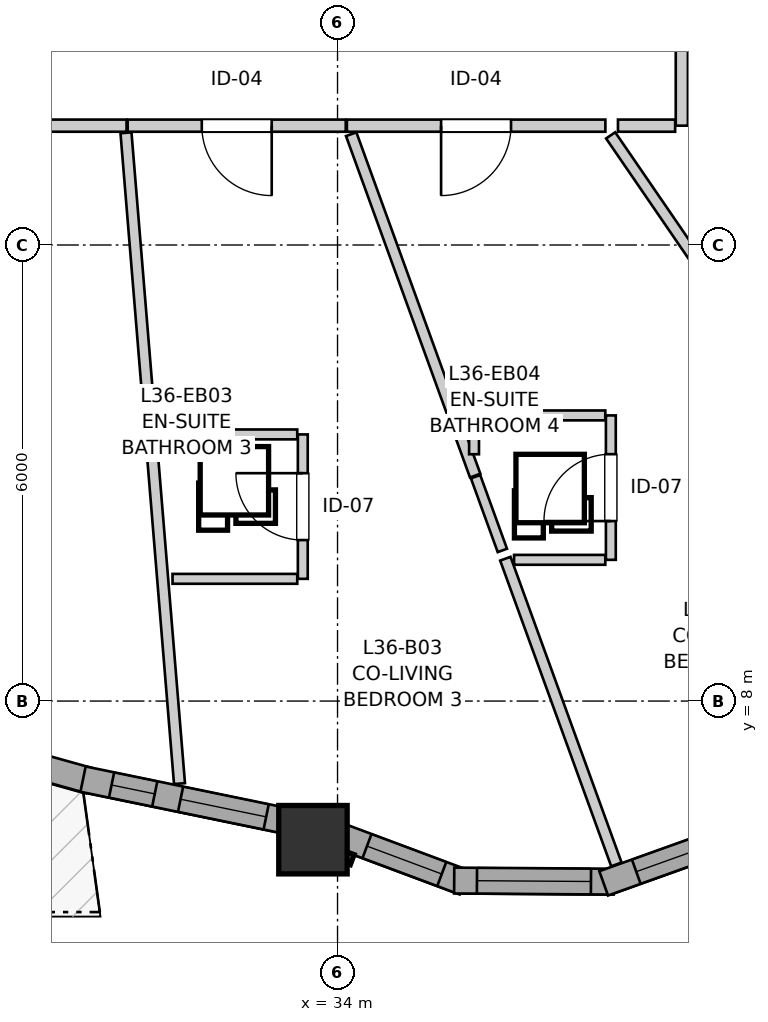
"""IFC4 building model, lengths in metres.
Left out: names, types, materials, properties, quantities, classifications, styles, units other than length and angle.
Written with IfcOpenShell. Run it as: python <this file> out.ifc"""

import sys

from ifc_helpers import new_model, si_unit, direction, frame, frame_2d, origin, origin_2d, place, context, subcontext, project, spatial, rectangle, extrude, source, transform, mapped, element, fill, save


model = new_model("IFC4")
c1 = context("Model", 3, precision=1e-05, world=origin(), true_north=direction((0.0, 1.0)))
c2 = subcontext(c1, "Body", "Model", "MODEL_VIEW")
j1 = project(units=[si_unit("LENGTHUNIT", "METRE"), si_unit("PLANEANGLEUNIT", "RADIAN")], contexts=[c1])
p1 = place(None, origin())
s1 = spatial("IfcSite", under=j1, at=p1, CompositionType="ELEMENT")
p2 = place(p1, origin())
s2 = spatial("IfcBuilding", under=s1, at=p2, CompositionType="ELEMENT")
p3 = place(p2, frame((0.0, 0.0, 121.6)))
s3 = spatial("IfcBuildingStorey", under=s2, at=p3, CompositionType="ELEMENT", Elevation=121.6)
m1 = source(origin(), c2, "Body", "SweptSolid", [
    extrude(rectangle(XDim=0.9, YDim=0.9, at=origin_2d()), origin(), (0.0, 0.0, 1.0), 2.95),
])
p4 = place(p3, frame((33.677, 6.176, 0.0), z_axis=(0.0, 0.0, 1.0), x_axis=(1.0, 0.0, 0.0)))
e1 = element("IfcColumn", 1, at=p4, inside=s3, PredefinedType="COLUMN", context=c2, shape_type="MappedRepresentation", body=[
    mapped(m1, transform((0.0, 0.0, 0.0), x_axis=(1.0, 0.0, 0.0), y_axis=(0.0, 1.0, 0.0), z_axis=(0.0, 0.0, 1.0), scale=1.0)),
])
p5 = place(p3, frame((27.811, 7.771, 0.0), z_axis=(0.0, 0.0, 1.0), x_axis=(0.963039905189, -0.269358758934, 0.0)))
e2 = element("IfcWall", 2, at=p5, inside=s3, PredefinedType="SOLIDWALL", context=c2, shape_type="SweptSolid", body=[
    extrude(rectangle(XDim=3.039, YDim=0.34, at=frame_2d((1.52, 0.0))), origin(), (0.0, 0.0, 1.0), 2.48),
])
p6 = place(p5, frame((0.935, 0.0, 0.82)))
e3 = element("IfcOpeningElement", 3, at=p6, cuts=e2, PredefinedType="OPENING", context=c2, shape_type="SweptSolid", body=[
    extrude(rectangle(XDim=1.15, YDim=1.2, at=frame_2d((0.575, 0.6))), frame((0.0, 0.18, 0.0), z_axis=(0.0, -1.0, 0.0), x_axis=(1.0, 0.0, 0.0)), (0.0, 0.0, 1.0), 0.36),
])
p7 = place(p3, frame((30.652, 6.973, 0.0), z_axis=(0.0, 0.0, 1.0), x_axis=(0.979418300652, -0.201841007595, 0.0)))
e4 = element("IfcWall", 4, at=p7, inside=s3, PredefinedType="SOLIDWALL", context=c2, shape_type="SweptSolid", body=[
    extrude(rectangle(XDim=2.893, YDim=0.34, at=frame_2d((1.447, 0.0))), origin(), (0.0, 0.0, 1.0), 2.48),
])
p8 = place(p7, frame((0.383, 0.0, 0.82)))
e5 = element("IfcOpeningElement", 5, at=p8, cuts=e4, PredefinedType="OPENING", context=c2, shape_type="SweptSolid", body=[
    extrude(rectangle(XDim=0.58, YDim=1.35, at=frame_2d((0.29, 0.675))), frame((0.0, 0.18, 0.0), z_axis=(0.0, -1.0, 0.0), x_axis=(1.0, 0.0, 0.0)), (0.0, 0.0, 1.0), 0.36),
])
p9 = place(p7, frame((1.31, 0.0, 0.82)))
e6 = element("IfcOpeningElement", 6, at=p9, cuts=e4, PredefinedType="OPENING", context=c2, shape_type="SweptSolid", body=[
    extrude(rectangle(XDim=1.15, YDim=1.2, at=frame_2d((0.575, 0.6))), frame((0.0, 0.18, 0.0), z_axis=(0.0, -1.0, 0.0), x_axis=(1.0, 0.0, 0.0)), (0.0, 0.0, 1.0), 0.36),
])
p10 = place(p3, frame((33.952, 6.255, 0.0), z_axis=(0.0, 0.0, 1.0), x_axis=(0.936799566991, -0.349866504951, 0.0)))
e7 = element("IfcWall", 7, at=p10, inside=s3, PredefinedType="SOLIDWALL", context=c2, shape_type="SweptSolid", body=[
    extrude(rectangle(XDim=1.831, YDim=0.34, at=frame_2d((0.916, 0.0))), origin(), (0.0, 0.0, 1.0), 2.48),
])
p11 = place(p10, frame((0.466, 0.0, 0.82)))
e8 = element("IfcOpeningElement", 8, at=p11, cuts=e7, PredefinedType="OPENING", context=c2, shape_type="SweptSolid", body=[
    extrude(rectangle(XDim=1.05, YDim=1.45, at=frame_2d((0.525, 0.725))), frame((0.0, 0.18, 0.0), z_axis=(0.0, -1.0, 0.0), x_axis=(1.0, 0.0, 0.0)), (0.0, 0.0, 1.0), 0.36),
])
p12 = place(p3, frame((35.535, 5.639, 0.0), z_axis=(0.0, 0.0, 1.0), x_axis=(0.999976456891, -0.00686189939, 0.0)))
e9 = element("IfcWall", 9, at=p12, inside=s3, PredefinedType="SOLIDWALL", context=c2, shape_type="SweptSolid", body=[
    extrude(rectangle(XDim=2.099, YDim=0.34, at=frame_2d((1.05, 0.0))), origin(), (0.0, 0.0, 1.0), 2.48),
])
p13 = place(p12, frame((0.3, 0.0, 0.82)))
e10 = element("IfcOpeningElement", 10, at=p13, cuts=e9, PredefinedType="OPENING", context=c2, shape_type="SweptSolid", body=[
    extrude(rectangle(XDim=1.5, YDim=1.45, at=frame_2d((0.75, 0.725))), frame((0.0, 0.18, 0.0), z_axis=(0.0, -1.0, 0.0), x_axis=(1.0, 0.0, 0.0)), (0.0, 0.0, 1.0), 0.36),
])
p14 = place(p3, frame((37.502, 5.602, 0.0), z_axis=(0.0, 0.0, 1.0), x_axis=(0.941523304278, 0.336947870598, 0.0)))
e11 = element("IfcWall", 11, at=p14, inside=s3, PredefinedType="SOLIDWALL", context=c2, shape_type="SweptSolid", body=[
    extrude(rectangle(XDim=2.099, YDim=0.34, at=frame_2d((1.05, 0.0))), origin(), (0.0, 0.0, 1.0), 2.48),
])
p15 = place(p14, frame((0.455, 0.0, 0.82)))
e12 = element("IfcOpeningElement", 12, at=p15, cuts=e11, PredefinedType="OPENING", context=c2, shape_type="SweptSolid", body=[
    extrude(rectangle(XDim=1.35, YDim=1.45, at=frame_2d((0.675, 0.725))), frame((0.0, 0.18, 0.0), z_axis=(0.0, -1.0, 0.0), x_axis=(1.0, 0.0, 0.0)), (0.0, 0.0, 1.0), 0.36),
])
p16 = place(p3, frame((38.53, 21.321, 0.0), z_axis=(0.0, 0.0, 1.0), x_axis=(0.0, -1.0, 0.0)))
e13 = element("IfcWall", 13, at=p16, inside=s3, PredefinedType="PARTITIONING", context=c2, shape_type="SweptSolid", body=[
    extrude(rectangle(XDim=5.751, YDim=0.16, at=frame_2d((2.875, 0.0))), origin(), (0.0, 0.0, 1.0), 2.95),
])
p17 = place(p16, frame((2.404, 0.0, 0.0)))
e14 = element("IfcOpeningElement", 14, at=p17, cuts=e13, PredefinedType="OPENING", context=c2, shape_type="SweptSolid", body=[
    extrude(rectangle(XDim=0.96, YDim=2.1, at=frame_2d((0.48, 1.05))), frame((0.0, 0.09, 0.0), z_axis=(0.0, -1.0, 0.0), x_axis=(1.0, 0.0, 0.0)), (0.0, 0.0, 1.0), 0.18),
])
p18 = place(p3, frame((31.224, 15.57, 0.0), z_axis=(0.0, 0.0, 1.0), x_axis=(-1.0, 0.0, 0.0)))
e15 = element("IfcWall", 15, at=p18, inside=s3, PredefinedType="PARTITIONING", context=c2, shape_type="SweptSolid", body=[
    extrude(rectangle(XDim=3.679, YDim=0.16, at=frame_2d((1.84, 0.0))), origin(), (0.0, 0.0, 1.0), 2.95),
])
p19 = place(p18, frame((1.212, 0.0, 0.0)))
e16 = element("IfcOpeningElement", 16, at=p19, cuts=e15, PredefinedType="OPENING", context=c2, shape_type="SweptSolid", body=[
    extrude(rectangle(XDim=1.3, YDim=2.1, at=frame_2d((0.65, 1.05))), frame((0.0, 0.09, 0.0), z_axis=(0.0, -1.0, 0.0), x_axis=(1.0, 0.0, 0.0)), (0.0, 0.0, 1.0), 0.18),
])
p20 = place(p3, frame((37.524, 15.57, 0.0), z_axis=(0.0, 0.0, 1.0), x_axis=(-1.0, 0.0, 0.0)))
e17 = element("IfcWall", 17, at=p20, inside=s3, PredefinedType="PARTITIONING", context=c2, shape_type="SweptSolid", body=[
    extrude(rectangle(XDim=3.401, YDim=0.16, at=frame_2d((1.7, 0.0))), origin(), (0.0, 0.0, 1.0), 2.95),
])
p21 = place(p20, frame((1.241, 0.0, 0.0)))
e18 = element("IfcOpeningElement", 18, at=p21, cuts=e17, PredefinedType="OPENING", context=c2, shape_type="SweptSolid", body=[
    extrude(rectangle(XDim=0.92, YDim=2.1, at=frame_2d((0.46, 1.05))), frame((0.0, 0.09, 0.0), z_axis=(0.0, -1.0, 0.0), x_axis=(1.0, 0.0, 0.0)), (0.0, 0.0, 1.0), 0.18),
])
p22 = place(p3, frame((34.108, 15.57, 0.0), z_axis=(0.0, 0.0, 1.0), x_axis=(-1.0, 0.0, 0.0)))
e19 = element("IfcWall", 19, at=p22, inside=s3, PredefinedType="PARTITIONING", context=c2, shape_type="SweptSolid", body=[
    extrude(rectangle(XDim=2.869, YDim=0.16, at=frame_2d((1.435, 0.0))), origin(), (0.0, 0.0, 1.0), 2.95),
])
p23 = place(p22, frame((0.974, 0.0, 0.0)))
e20 = element("IfcOpeningElement", 20, at=p23, cuts=e19, PredefinedType="OPENING", context=c2, shape_type="SweptSolid", body=[
    extrude(rectangle(XDim=0.92, YDim=2.1, at=frame_2d((0.46, 1.05))), frame((0.0, 0.09, 0.0), z_axis=(0.0, -1.0, 0.0), x_axis=(1.0, 0.0, 0.0)), (0.0, 0.0, 1.0), 0.18),
])
p24 = place(p3, frame((33.543, 9.608, 0.0), z_axis=(0.0, 0.0, 1.0), x_axis=(0.0, 1.0, 0.0)))
e21 = element("IfcWall", 21, at=p24, inside=s3, PredefinedType="PARTITIONING", context=c2, shape_type="SweptSolid", body=[
    extrude(rectangle(XDim=1.9, YDim=0.13, at=frame_2d((0.95, 0.0))), origin(), (0.0, 0.0, 1.0), 2.95),
])
p25 = place(p24, frame((0.51, 0.0, 0.0)))
e22 = element("IfcOpeningElement", 22, at=p25, cuts=e21, PredefinedType="OPENING", context=c2, shape_type="SweptSolid", body=[
    extrude(rectangle(XDim=0.88, YDim=2.05, at=frame_2d((0.44, 1.025))), frame((0.0, 0.075, 0.0), z_axis=(0.0, -1.0, 0.0), x_axis=(1.0, 0.0, 0.0)), (0.0, 0.0, 1.0), 0.15),
])
p26 = place(p3, frame((37.596, 9.858, 0.0), z_axis=(0.0, 0.0, 1.0), x_axis=(0.0, 1.0, 0.0)))
e23 = element("IfcWall", 23, at=p26, inside=s3, PredefinedType="PARTITIONING", context=c2, shape_type="SweptSolid", body=[
    extrude(rectangle(XDim=1.9, YDim=0.13, at=frame_2d((0.95, 0.0))), origin(), (0.0, 0.0, 1.0), 2.95),
])
p27 = place(p26, frame((0.51, 0.0, 0.0)))
e24 = element("IfcOpeningElement", 24, at=p27, cuts=e23, PredefinedType="OPENING", context=c2, shape_type="SweptSolid", body=[
    extrude(rectangle(XDim=0.88, YDim=2.05, at=frame_2d((0.44, 1.025))), frame((0.0, 0.075, 0.0), z_axis=(0.0, -1.0, 0.0), x_axis=(1.0, 0.0, 0.0)), (0.0, 0.0, 1.0), 0.15),
])
p28 = place(p3, frame((31.217, 15.476, 0.0), z_axis=(0.0, 0.0, 1.0), x_axis=(0.081928316893, -0.996638224679, 0.0)))
e25 = element("IfcWall", 25, at=p28, inside=s3, PredefinedType="PARTITIONING", context=c2, shape_type="SweptSolid", body=[
    extrude(rectangle(XDim=8.591, YDim=0.145, at=frame_2d((4.295, 0.0))), origin(), (0.0, 0.0, 1.0), 2.95),
])
p29 = place(p3, frame((37.594, 15.442, 0.0), z_axis=(0.0, 0.0, 1.0), x_axis=(0.565681325722, -0.824623937155, 0.0)))
e26 = element("IfcWall", 26, at=p29, inside=s3, PredefinedType="PARTITIONING", context=c2, shape_type="SweptSolid", body=[
    extrude(rectangle(XDim=7.35, YDim=0.145, at=frame_2d((3.675, 0.0))), origin(), (0.0, 0.0, 1.0), 2.95),
])
p30 = place(p3, frame((34.18, 15.458, 0.0), z_axis=(0.0, 0.0, 1.0), x_axis=(0.341373856507, -0.939927598325, 0.0)))
e27 = element("IfcWall", 27, at=p30, inside=s3, PredefinedType="PARTITIONING", context=c2, shape_type="SweptSolid", body=[
    extrude(rectangle(XDim=4.779, YDim=0.145, at=frame_2d((2.389, 0.0))), origin(), (0.0, 0.0, 1.0), 2.95),
])
p31 = place(p3, frame((36.208, 9.873, 0.0), z_axis=(0.0, 0.0, 1.0), x_axis=(0.341362804218, -0.939931612351, 0.0)))
e28 = element("IfcWall", 28, at=p31, inside=s3, PredefinedType="PARTITIONING", context=c2, shape_type="SweptSolid", body=[
    extrude(rectangle(XDim=4.279, YDim=0.145, at=frame_2d((2.14, 0.0))), origin(), (0.0, 0.0, 1.0), 2.95),
])
p32 = place(p3, frame((31.743, 11.508, 0.0), z_axis=(0.0, 0.0, 1.0), x_axis=(1.0, 0.0, 0.0)))
e29 = element("IfcWall", 29, at=p32, inside=s3, PredefinedType="PARTITIONING", context=c2, shape_type="SweptSolid", body=[
    extrude(rectangle(XDim=1.727, YDim=0.13, at=frame_2d((0.864, 0.0))), origin(), (0.0, 0.0, 1.0), 2.95),
])
p33 = place(p3, frame((31.829, 9.608, 0.0), z_axis=(0.0, 0.0, 1.0), x_axis=(1.0, 0.0, 0.0)))
e30 = element("IfcWall", 30, at=p33, inside=s3, PredefinedType="PARTITIONING", context=c2, shape_type="SweptSolid", body=[
    extrude(rectangle(XDim=1.641, YDim=0.13, at=frame_2d((0.82, 0.0))), origin(), (0.0, 0.0, 1.0), 2.558),
])
p34 = place(p3, frame((35.796, 11.758, 0.0), z_axis=(0.0, 0.0, 1.0), x_axis=(1.0, 0.0, 0.0)))
e31 = element("IfcWall", 31, at=p34, inside=s3, PredefinedType="PARTITIONING", context=c2, shape_type="SweptSolid", body=[
    extrude(rectangle(XDim=1.727, YDim=0.13, at=frame_2d((0.864, 0.0))), origin(), (0.0, 0.0, 1.0), 2.95),
])
p35 = place(p3, frame((36.323, 9.858, 0.0), z_axis=(0.0, 0.0, 1.0), x_axis=(1.0, 0.0, 0.0)))
e32 = element("IfcWall", 32, at=p35, inside=s3, PredefinedType="PARTITIONING", context=c2, shape_type="SweptSolid", body=[
    extrude(rectangle(XDim=1.2, YDim=0.13, at=frame_2d((0.6, 0.0))), origin(), (0.0, 0.0, 1.0), 2.95),
])
p36 = place(p3, frame((35.816, 10.952, 0.0), z_axis=(0.0, 0.0, 1.0), x_axis=(0.341515178303, -0.939876259403, 0.0)))
e33 = element("IfcWall", 33, at=p36, inside=s3, PredefinedType="PARTITIONING", context=c2, shape_type="SweptSolid", body=[
    extrude(rectangle(XDim=1.032, YDim=0.13, at=frame_2d((0.516, 0.0))), origin(), (0.0, 0.0, 1.0), 2.95),
])
p37 = place(p3, frame((37.69, 15.57, 0.0), z_axis=(0.0, 0.0, 1.0), x_axis=(1.0, 0.0, 0.0)))
e34 = element("IfcWall", 34, at=p37, inside=s3, PredefinedType="PARTITIONING", context=c2, shape_type="SweptSolid", body=[
    extrude(rectangle(XDim=0.752, YDim=0.16, at=frame_2d((0.376, 0.0))), origin(), (0.0, 0.0, 1.0), 2.95),
])
p38 = place(p3, frame((35.796, 11.247, 0.0), z_axis=(0.0, 0.0, 1.0), x_axis=(0.0, 1.0, 0.0)))
e35 = element("IfcWall", 35, at=p38, inside=s3, PredefinedType="PARTITIONING", context=c2, shape_type="SweptSolid", body=[
    extrude(rectangle(XDim=0.438, YDim=0.13, at=frame_2d((0.219, 0.0))), origin(), (0.0, 0.0, 1.0), 2.95),
])
m2 = source(origin(), c2, "Body", "SweptSolid", [
    extrude(rectangle(XDim=0.58, YDim=1.35, at=frame_2d((0.29, 0.675))), frame((0.0, 0.03, 0.0), z_axis=(0.0, -1.0, 0.0), x_axis=(1.0, 0.0, 0.0)), (0.0, 0.0, 1.0), 0.06),
])
p39 = place(p8, origin())
e36 = element("IfcWindow", 36, at=p39, inside=s3, PartitioningType="SINGLE_PANEL", PredefinedType="WINDOW", context=c2, shape_type="MappedRepresentation", body=[
    mapped(m2, transform((0.0, 0.0, 0.0), x_axis=(1.0, 0.0, 0.0), y_axis=(0.0, 1.0, 0.0), z_axis=(0.0, 0.0, 1.0), scale=1.0)),
])
fill(e5, e36)
m3 = source(origin(), c2, "Body", "SweptSolid", [
    extrude(rectangle(XDim=1.15, YDim=1.2, at=frame_2d((0.575, 0.6))), frame((0.0, 0.03, 0.0), z_axis=(0.0, -1.0, 0.0), x_axis=(1.0, 0.0, 0.0)), (0.0, 0.0, 1.0), 0.06),
])
p40 = place(p9, origin())
e37 = element("IfcWindow", 37, at=p40, inside=s3, PartitioningType="SINGLE_PANEL", PredefinedType="WINDOW", context=c2, shape_type="MappedRepresentation", body=[
    mapped(m3, transform((0.0, 0.0, 0.0), x_axis=(1.0, 0.0, 0.0), y_axis=(0.0, 1.0, 0.0), z_axis=(0.0, 0.0, 1.0), scale=1.0)),
])
fill(e6, e37)
m4 = source(origin(), c2, "Body", "SweptSolid", [
    extrude(rectangle(XDim=1.05, YDim=1.45, at=frame_2d((0.525, 0.725))), frame((0.0, 0.03, 0.0), z_axis=(0.0, -1.0, 0.0), x_axis=(1.0, 0.0, 0.0)), (0.0, 0.0, 1.0), 0.06),
])
p41 = place(p11, origin())
e38 = element("IfcWindow", 38, at=p41, inside=s3, PartitioningType="SINGLE_PANEL", PredefinedType="WINDOW", context=c2, shape_type="MappedRepresentation", body=[
    mapped(m4, transform((0.0, 0.0, 0.0), x_axis=(1.0, 0.0, 0.0), y_axis=(0.0, 1.0, 0.0), z_axis=(0.0, 0.0, 1.0), scale=1.0)),
])
fill(e8, e38)
m5 = source(origin(), c2, "Body", "SweptSolid", [
    extrude(rectangle(XDim=1.5, YDim=1.45, at=frame_2d((0.75, 0.725))), frame((0.0, 0.03, 0.0), z_axis=(0.0, -1.0, 0.0), x_axis=(1.0, 0.0, 0.0)), (0.0, 0.0, 1.0), 0.06),
])
p42 = place(p13, origin())
e39 = element("IfcWindow", 39, at=p42, inside=s3, PartitioningType="SINGLE_PANEL", PredefinedType="WINDOW", context=c2, shape_type="MappedRepresentation", body=[
    mapped(m5, transform((0.0, 0.0, 0.0), x_axis=(1.0, 0.0, 0.0), y_axis=(0.0, 1.0, 0.0), z_axis=(0.0, 0.0, 1.0), scale=1.0)),
])
fill(e10, e39)
m6 = source(origin(), c2, "Body", "SweptSolid", [
    extrude(rectangle(XDim=1.35, YDim=1.45, at=frame_2d((0.675, 0.725))), frame((0.0, 0.03, 0.0), z_axis=(0.0, -1.0, 0.0), x_axis=(1.0, 0.0, 0.0)), (0.0, 0.0, 1.0), 0.06),
])
p43 = place(p15, origin())
e40 = element("IfcWindow", 40, at=p43, inside=s3, PartitioningType="SINGLE_PANEL", PredefinedType="WINDOW", context=c2, shape_type="MappedRepresentation", body=[
    mapped(m6, transform((0.0, 0.0, 0.0), x_axis=(1.0, 0.0, 0.0), y_axis=(0.0, 1.0, 0.0), z_axis=(0.0, 0.0, 1.0), scale=1.0)),
])
fill(e12, e40)
m7 = source(origin(), c2, "Body", "SweptSolid", [
    extrude(rectangle(XDim=0.92, YDim=2.1, at=frame_2d((0.46, 1.05))), frame((0.0, 0.025, 0.0), z_axis=(0.0, -1.0, 0.0), x_axis=(1.0, 0.0, 0.0)), (0.0, 0.0, 1.0), 0.05),
])
p44 = place(p21, origin())
e41 = element("IfcDoor", 41, at=p44, inside=s3, OperationType="SINGLE_SWING_RIGHT", PredefinedType="DOOR", context=c2, shape_type="MappedRepresentation", body=[
    mapped(m7, transform((0.0, 0.0, 0.0), x_axis=(1.0, 0.0, 0.0), y_axis=(0.0, 1.0, 0.0), z_axis=(0.0, 0.0, 1.0), scale=1.0)),
])
fill(e18, e41)
p45 = place(p23, origin())
e42 = element("IfcDoor", 42, at=p45, inside=s3, OperationType="SINGLE_SWING_LEFT", PredefinedType="DOOR", context=c2, shape_type="MappedRepresentation", body=[
    mapped(m7, transform((0.0, 0.0, 0.0), x_axis=(1.0, 0.0, 0.0), y_axis=(0.0, 1.0, 0.0), z_axis=(0.0, 0.0, 1.0), scale=1.0)),
])
fill(e20, e42)
m8 = source(origin(), c2, "Body", "SweptSolid", [
    extrude(rectangle(XDim=0.88, YDim=2.05, at=frame_2d((0.44, 1.025))), frame((0.0, 0.025, 0.0), z_axis=(0.0, -1.0, 0.0), x_axis=(1.0, 0.0, 0.0)), (0.0, 0.0, 1.0), 0.05),
])
p46 = place(p25, origin())
e43 = element("IfcDoor", 43, at=p46, inside=s3, OperationType="SINGLE_SWING_RIGHT", PredefinedType="DOOR", context=c2, shape_type="MappedRepresentation", body=[
    mapped(m8, transform((0.0, 0.0, 0.0), x_axis=(1.0, 0.0, 0.0), y_axis=(0.0, 1.0, 0.0), z_axis=(0.0, 0.0, 1.0), scale=1.0)),
])
fill(e22, e43)
p47 = place(p27, origin())
e44 = element("IfcDoor", 44, at=p47, inside=s3, OperationType="SINGLE_SWING_LEFT", PredefinedType="DOOR", context=c2, shape_type="MappedRepresentation", body=[
    mapped(m8, transform((0.0, 0.0, 0.0), x_axis=(1.0, 0.0, 0.0), y_axis=(0.0, 1.0, 0.0), z_axis=(0.0, 0.0, 1.0), scale=1.0)),
])
fill(e24, e44)
save(model, sys.argv[1])
